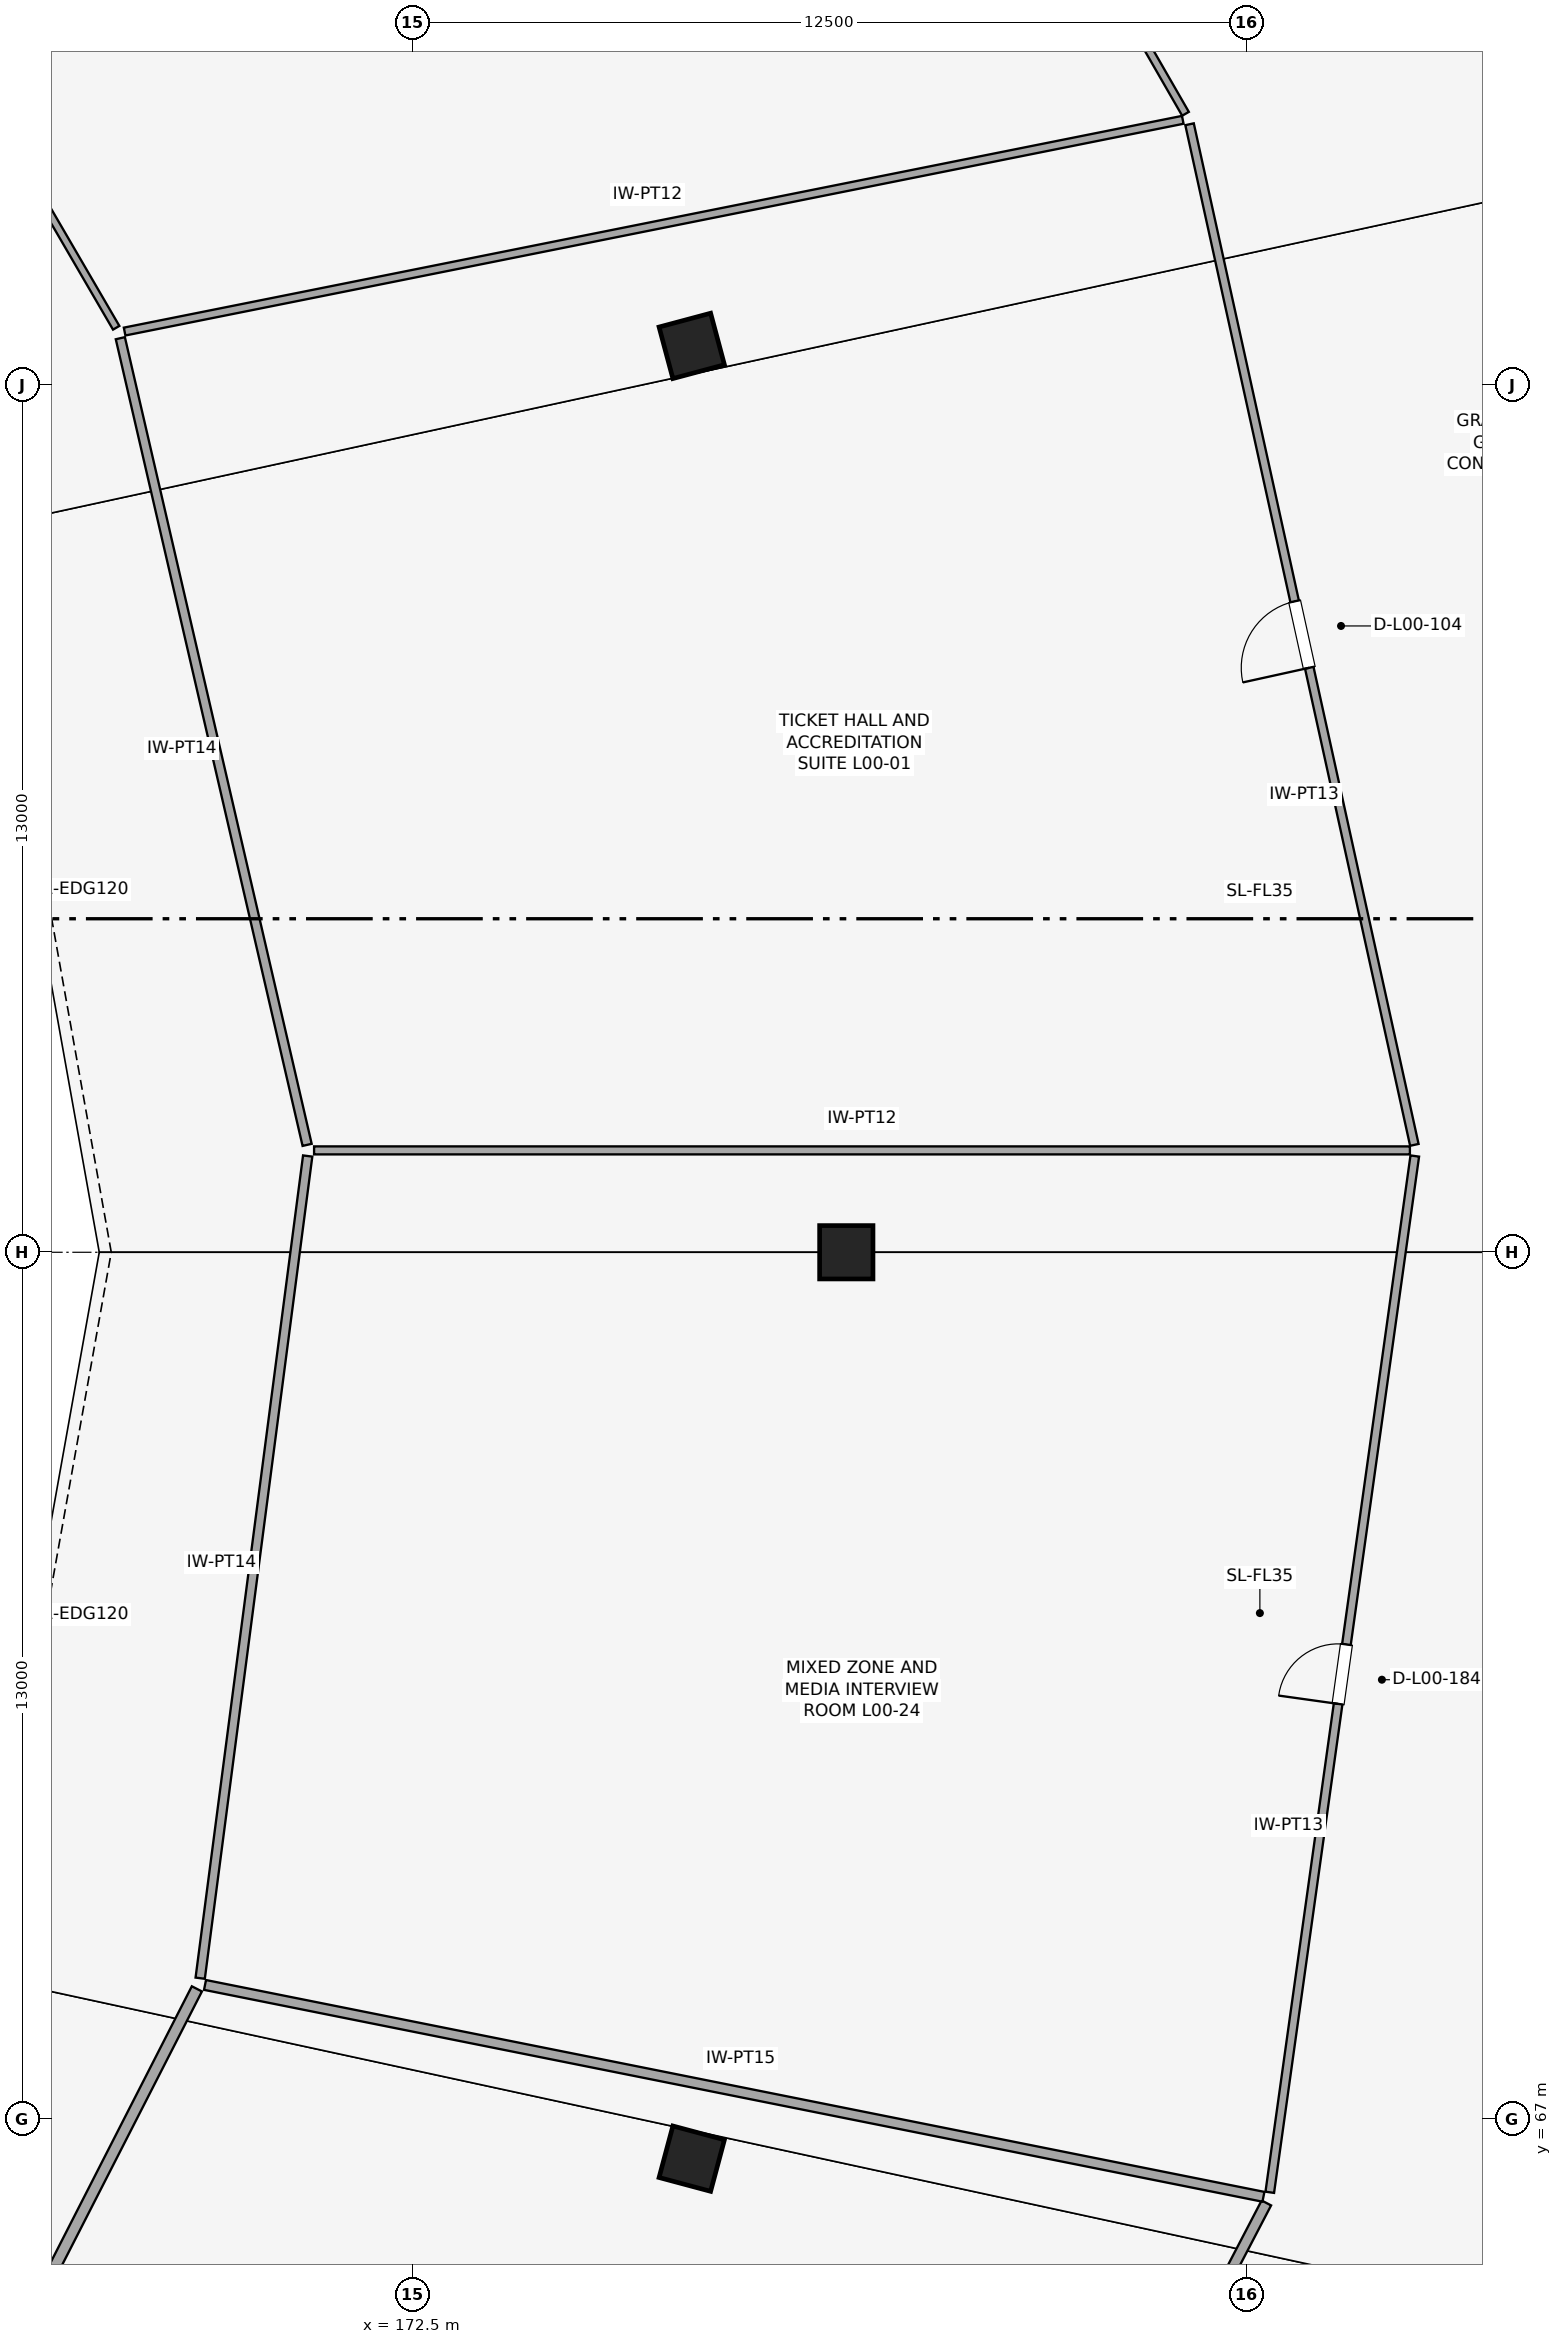
"""IFC4 building model, lengths in metres.
Left out: names, types, materials, properties, quantities, classifications, styles, units other than length and angle.
Written with IfcOpenShell. Run it as: python <this file> out.ifc"""

import sys

from ifc_helpers import new_model, si_unit, direction, frame, frame_2d, origin, origin_2d, place, context, subcontext, project, spatial, rectangle, extrude, element, fill, save


model = new_model("IFC4")
c1 = context("Model", 3, precision=1e-05, world=origin(), true_north=direction((0.0, 1.0)))
c2 = subcontext(c1, "Body", "Model", "MODEL_VIEW")
j1 = project(units=[si_unit("LENGTHUNIT", "METRE"), si_unit("PLANEANGLEUNIT", "RADIAN")], contexts=[c1])
p1 = place(None, origin())
s1 = spatial("IfcSite", under=j1, at=p1, CompositionType="ELEMENT")
p2 = place(p1, origin())
s2 = spatial("IfcBuilding", under=s1, at=p2, CompositionType="ELEMENT")
p3 = place(p2, origin())
s3 = spatial("IfcBuildingStorey", under=s2, at=p3, CompositionType="ELEMENT", Elevation=0.0)
for number, where, z_axis, x_axis in (
    (1, (179.0, 80.0, 0.0), (0.0, 0.0, 1.0), (1.0, 0.0, 0.0)),
    (2, (176.683, 93.588, 0.0), (0.0, 0.0, 1.0), (0.966, 0.259, 0.0)),
    (3, (176.683, 66.412, 0.0), (0.0, 0.0, 1.0), (0.966, -0.259, 0.0)),
):
    element("IfcColumn", number, at=place(p3, frame(where, z_axis=z_axis, x_axis=x_axis)), inside=s3, PredefinedType="COLUMN", context=c2, shape_type="SweptSolid", body=[
        extrude(rectangle(XDim=0.8, YDim=0.8, at=origin_2d()), origin(), (0.0, 0.0, 1.0), 5.4),
    ])
p4 = place(p3, frame((170.917, 81.61, 0.0), z_axis=(0.0, 0.0, 1.0), x_axis=(-0.225607806151, 0.974218208516, 0.0)))
e4 = element("IfcWall", 4, at=p4, inside=s3, PredefinedType="PARTITIONING", context=c2, shape_type="SweptSolid", body=[
    extrude(rectangle(XDim=12.413, YDim=0.14, at=frame_2d((6.207, 0.0))), origin(), (0.0, 0.0, 1.0), 3.69),
])
p5 = place(p3, frame((187.516, 81.61, 0.0), z_axis=(0.0, 0.0, 1.0), x_axis=(-0.215105238973, 0.976590874505, 0.0)))
e5 = element("IfcWall", 5, at=p5, inside=s3, PredefinedType="PARTITIONING", context=c2, shape_type="SweptSolid", body=[
    extrude(rectangle(XDim=15.667, YDim=0.13, at=frame_2d((7.833, 0.0))), origin(), (0.0, 0.0, 1.0), 3.69),
])
p6 = place(p5, frame((7.324, 0.0, 0.0)))
e6 = element("IfcOpeningElement", 6, at=p6, cuts=e5, PredefinedType="OPENING", context=c2, shape_type="SweptSolid", body=[
    extrude(rectangle(XDim=1.02, YDim=2.1, at=frame_2d((0.51, 1.05))), frame((0.0, 0.075, 0.0), z_axis=(0.0, -1.0, 0.0), x_axis=(1.0, 0.0, 0.0)), (0.0, 0.0, 1.0), 0.15),
])
p7 = place(p3, frame((168.18, 93.803, 0.0), z_axis=(0.0, 0.0, 1.0), x_axis=(0.980564421787, 0.196197387154, 0.0)))
e7 = element("IfcWall", 7, at=p7, inside=s3, PredefinedType="PARTITIONING", context=c2, shape_type="SweptSolid", body=[
    extrude(rectangle(XDim=16.179, YDim=0.12, at=frame_2d((8.09, 0.0))), origin(), (0.0, 0.0, 1.0), 3.69),
])
p8 = place(p3, frame((168.054, 93.86, 0.0), z_axis=(0.0, 0.0, 1.0), x_axis=(-0.503217451953, 0.864159820895, 0.0)))
e8 = element("IfcWall", 8, at=p8, inside=s3, PredefinedType="PARTITIONING", context=c2, shape_type="SweptSolid", body=[
    extrude(rectangle(XDim=11.313, YDim=0.11, at=frame_2d((5.657, 0.0))), origin(), (0.0, 0.0, 1.0), 3.69),
])
p9 = place(p3, frame((184.085, 97.067, 0.0), z_axis=(0.0, 0.0, 1.0), x_axis=(-0.498943700715, 0.866634400146, 0.0)))
e9 = element("IfcWall", 9, at=p9, inside=s3, PredefinedType="MOVABLE", context=c2, shape_type="SweptSolid", body=[
    extrude(rectangle(XDim=14.732, YDim=0.115, at=frame_2d((7.366, 0.0))), origin(), (0.0, 0.0, 1.0), 3.69),
])
p10 = place(p9, frame((6.826, 0.0, 0.0)))
e10 = element("IfcOpeningElement", 10, at=p10, cuts=e9, PredefinedType="OPENING", context=c2, shape_type="SweptSolid", body=[
    extrude(rectangle(XDim=1.08, YDim=2.24, at=frame_2d((0.54, 1.12))), frame((0.0, 0.067, 0.0), z_axis=(0.0, -1.0, 0.0), x_axis=(1.0, 0.0, 0.0)), (0.0, 0.0, 1.0), 0.135),
])
p11 = place(p3, frame((164.273, 59.196, 0.0), z_axis=(0.0, 0.0, 1.0), x_axis=(0.455186001509, 0.890396374673, 0.0)))
e11 = element("IfcWall", 11, at=p11, inside=s3, PredefinedType="PARTITIONING", context=c2, shape_type="SweptSolid", body=[
    extrude(rectangle(XDim=10.963, YDim=0.17, at=frame_2d((5.481, 0.0))), origin(), (0.0, 0.0, 1.0), 3.69),
])
p12 = place(p3, frame((178.653, 52.994, 0.0), z_axis=(0.0, 0.0, 1.0), x_axis=(0.46202288494, 0.886868002463, 0.0)))
e12 = element("IfcWall", 12, at=p12, inside=s3, PredefinedType="PARTITIONING", context=c2, shape_type="SweptSolid", body=[
    extrude(rectangle(XDim=14.381, YDim=0.16, at=frame_2d((7.191, 0.0))), origin(), (0.0, 0.0, 1.0), 3.69),
])
p13 = place(p12, frame((6.651, 0.0, 0.0)))
e13 = element("IfcOpeningElement", 13, at=p13, cuts=e12, PredefinedType="OPENING", context=c2, shape_type="SweptSolid", body=[
    extrude(rectangle(XDim=1.08, YDim=2.38, at=frame_2d((0.54, 1.19))), frame((0.0, 0.09, 0.0), z_axis=(0.0, -1.0, 0.0), x_axis=(1.0, 0.0, 0.0)), (0.0, 0.0, 1.0), 0.18),
])
p14 = place(p3, frame((169.385, 69.016, 0.0), z_axis=(0.0, 0.0, 1.0), x_axis=(0.980552814496, -0.196255389692, 0.0)))
e14 = element("IfcWall", 14, at=p14, inside=s3, PredefinedType="PARTITIONING", context=c2, shape_type="SweptSolid", body=[
    extrude(rectangle(XDim=16.183, YDim=0.15, at=frame_2d((8.092, 0.0))), origin(), (0.0, 0.0, 1.0), 3.69),
])
p15 = place(p3, frame((169.313, 69.117, 0.0), z_axis=(0.0, 0.0, 1.0), x_axis=(0.129643122205, 0.991560719706, 0.0)))
e15 = element("IfcWall", 15, at=p15, inside=s3, PredefinedType="PARTITIONING", context=c2, shape_type="SweptSolid", body=[
    extrude(rectangle(XDim=12.431, YDim=0.14, at=frame_2d((6.215, 0.0))), origin(), (0.0, 0.0, 1.0), 3.69),
])
p16 = place(p3, frame((185.349, 65.908, 0.0), z_axis=(0.0, 0.0, 1.0), x_axis=(0.13859472383, 0.99034918212, 0.0)))
e16 = element("IfcWall", 16, at=p16, inside=s3, PredefinedType="PARTITIONING", context=c2, shape_type="SweptSolid", body=[
    extrude(rectangle(XDim=15.687, YDim=0.13, at=frame_2d((7.843, 0.0))), origin(), (0.0, 0.0, 1.0), 3.69),
])
p17 = place(p16, frame((7.393, 0.0, 0.0)))
e17 = element("IfcOpeningElement", 17, at=p17, cuts=e16, PredefinedType="OPENING", context=c2, shape_type="SweptSolid", body=[
    extrude(rectangle(XDim=0.9, YDim=2.1, at=frame_2d((0.45, 1.05))), frame((0.0, 0.075, 0.0), z_axis=(0.0, -1.0, 0.0), x_axis=(1.0, 0.0, 0.0)), (0.0, 0.0, 1.0), 0.15),
])
p18 = place(p3, frame((171.021, 81.527, 0.0), z_axis=(0.0, 0.0, 1.0), x_axis=(0.99999999989, -1.4860387e-05, 0.0)))
e18 = element("IfcWall", 18, at=p18, inside=s3, PredefinedType="PARTITIONING", context=c2, shape_type="SweptSolid", body=[
    extrude(rectangle(XDim=16.429, YDim=0.12, at=frame_2d((8.214, 0.0))), origin(), (0.0, 0.0, 1.0), 3.69),
])
p19 = place(p6, origin())
e19 = element("IfcDoor", 19, at=p19, inside=s3, OperationType="SINGLE_SWING_LEFT", PredefinedType="DOOR", context=c2, shape_type="SweptSolid", body=[
    extrude(rectangle(XDim=1.02, YDim=2.1, at=frame_2d((0.51, 1.05))), frame((0.0, 0.025, 0.0), z_axis=(0.0, -1.0, 0.0), x_axis=(1.0, 0.0, 0.0)), (0.0, 0.0, 1.0), 0.05),
])
fill(e6, e19)
p20 = place(p17, origin())
e20 = element("IfcDoor", 20, at=p20, inside=s3, OperationType="SINGLE_SWING_LEFT", PredefinedType="DOOR", context=c2, shape_type="SweptSolid", body=[
    extrude(rectangle(XDim=0.9, YDim=2.1, at=frame_2d((0.45, 1.05))), frame((0.0, 0.025, 0.0), z_axis=(0.0, -1.0, 0.0), x_axis=(1.0, 0.0, 0.0)), (0.0, 0.0, 1.0), 0.05),
])
fill(e17, e20)
save(model, sys.argv[1])
